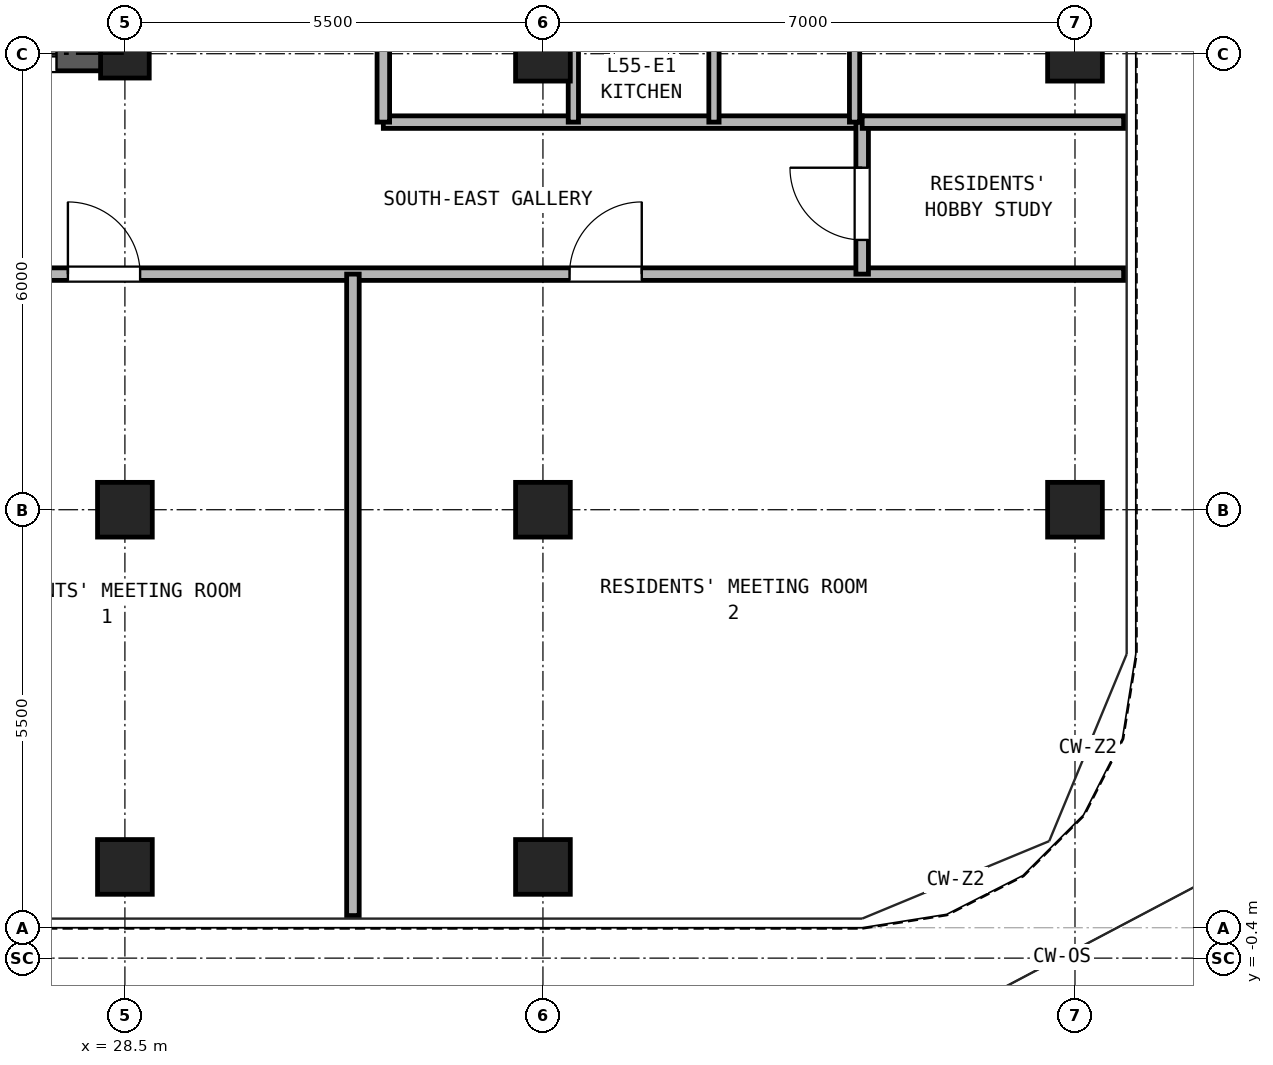
"""IFC4 building model, lengths in metres.
Left out: names, types, materials, properties, quantities, classifications, styles, units other than length and angle.
Written with IfcOpenShell. Run it as: python <this file> out.ifc"""

import sys

from ifc_helpers import new_model, si_unit, direction, frame, frame_2d, origin, origin_2d, place, context, subcontext, project, spatial, rectangle, hollow_rectangle, extrude, source, transform, mapped, element, fill, save


model = new_model("IFC4")
c1 = context("Model", 3, precision=1e-05, world=origin(), true_north=direction((0.0, 1.0)))
c2 = subcontext(c1, "Body", "Model", "MODEL_VIEW")
j1 = project(units=[si_unit("LENGTHUNIT", "METRE"), si_unit("PLANEANGLEUNIT", "RADIAN")], contexts=[c1])
p1 = place(None, origin())
s1 = spatial("IfcSite", under=j1, at=p1, CompositionType="ELEMENT")
p2 = place(p1, origin())
s2 = spatial("IfcBuilding", under=s1, at=p2, CompositionType="ELEMENT")
p3 = place(p2, frame((0.0, 0.0, 196.4)))
s3 = spatial("IfcBuildingStorey", under=s2, at=p3, CompositionType="ELEMENT", Elevation=196.4)
m1 = source(origin(), c2, "Body", "SweptSolid", [
    extrude(hollow_rectangle(XDim=0.72, YDim=0.72, WallThickness=0.04, at=origin_2d()), origin(), (0.0, 0.0, 1.0), 2.95),
])
for number, where, z_axis, x_axis in (
    (1, (28.5, 0.8, 0.0), (0.0, 0.0, 1.0), (1.0, 0.0, 0.0)),
    (2, (34.0, 0.8, 0.0), (0.0, 0.0, 1.0), (1.0, 0.0, 0.0)),
    (3, (41.0, 5.5, 0.0), (0.0, 0.0, 1.0), (1.0, 0.0, 0.0)),
    (4, (41.0, 11.5, 0.0), (0.0, 0.0, 1.0), (1.0, 0.0, 0.0)),
    (5, (28.5, 5.5, 0.0), (0.0, 0.0, 1.0), (1.0, 0.0, 0.0)),
):
    element("IfcColumn", number, at=place(p3, frame(where, z_axis=z_axis, x_axis=x_axis)), inside=s3, PredefinedType="COLUMN", context=c2, shape_type="MappedRepresentation", body=[
        mapped(m1, transform((0.0, 0.0, 0.0), x_axis=(1.0, 0.0, 0.0), y_axis=(0.0, 1.0, 0.0), z_axis=(0.0, 0.0, 1.0), scale=1.0)),
    ])
m2 = source(origin(), c2, "Body", "SweptSolid", [
    extrude(hollow_rectangle(XDim=0.64, YDim=0.64, WallThickness=0.035, at=origin_2d()), origin(), (0.0, 0.0, 1.0), 2.95),
])
p4 = place(p3, frame((28.5, 11.5, 0.0), z_axis=(0.0, 0.0, 1.0), x_axis=(1.0, 0.0, 0.0)))
e6 = element("IfcColumn", 6, at=p4, inside=s3, PredefinedType="COLUMN", context=c2, shape_type="MappedRepresentation", body=[
    mapped(m2, transform((0.0, 0.0, 0.0), x_axis=(1.0, 0.0, 0.0), y_axis=(0.0, 1.0, 0.0), z_axis=(0.0, 0.0, 1.0), scale=1.0)),
])
for number, where, z_axis, x_axis in (
    (7, (34.0, 5.5, 0.0), (0.0, 0.0, 1.0), (1.0, 0.0, 0.0)),
    (8, (34.0, 11.5, 0.0), (0.0, 0.0, 1.0), (1.0, 0.0, 0.0)),
):
    element("IfcColumn", number, at=place(p3, frame(where, z_axis=z_axis, x_axis=x_axis)), inside=s3, PredefinedType="COLUMN", context=c2, shape_type="MappedRepresentation", body=[
        mapped(m1, transform((0.0, 0.0, 0.0), x_axis=(1.0, 0.0, 0.0), y_axis=(0.0, 1.0, 0.0), z_axis=(0.0, 0.0, 1.0), scale=1.0)),
    ])
p5 = place(p3, frame((18.275, 11.5, 0.0), z_axis=(0.0, 0.0, 1.0), x_axis=(1.0, 0.0, 0.0)))
e9 = element("IfcWall", 9, at=p5, inside=s3, PredefinedType="SHEAR", context=c2, shape_type="SweptSolid", body=[
    extrude(rectangle(XDim=10.45, YDim=0.45, at=frame_2d((5.225, 0.0))), origin(), (0.0, 0.0, 1.0), 2.95),
])
p6 = place(p5, frame((1.825, 0.0, 0.0)))
e10 = element("IfcOpeningElement", 10, at=p6, cuts=e9, PredefinedType="OPENING", context=c2, shape_type="SweptSolid", body=[
    extrude(rectangle(XDim=0.95, YDim=2.15, at=frame_2d((0.475, 1.075))), frame((0.0, 0.235, 0.0), z_axis=(0.0, -1.0, 0.0), x_axis=(1.0, 0.0, 0.0)), (0.0, 0.0, 1.0), 0.47),
])
p7 = place(p5, frame((5.325, 0.0, 0.0)))
e11 = element("IfcOpeningElement", 11, at=p7, cuts=e9, PredefinedType="OPENING", context=c2, shape_type="SweptSolid", body=[
    extrude(rectangle(XDim=0.95, YDim=2.15, at=frame_2d((0.475, 1.075))), frame((0.0, 0.235, 0.0), z_axis=(0.0, -1.0, 0.0), x_axis=(1.0, 0.0, 0.0)), (0.0, 0.0, 1.0), 0.47),
])
p8 = place(p5, frame((8.225, 0.0, 0.0)))
e12 = element("IfcOpeningElement", 12, at=p8, cuts=e9, PredefinedType="OPENING", context=c2, shape_type="SweptSolid", body=[
    extrude(rectangle(XDim=1.1, YDim=2.25, at=frame_2d((0.55, 1.125))), frame((0.0, 0.235, 0.0), z_axis=(0.0, -1.0, 0.0), x_axis=(1.0, 0.0, 0.0)), (0.0, 0.0, 1.0), 0.47),
])
p9 = place(p3, frame((0.16, 8.6, 0.0), z_axis=(0.0, 0.0, 1.0), x_axis=(1.0, 0.0, 0.0)))
e13 = element("IfcWall", 13, at=p9, inside=s3, PredefinedType="PARTITIONING", context=c2, shape_type="SweptSolid", body=[
    extrude(rectangle(XDim=41.48, YDim=0.165, at=frame_2d((20.74, 0.0))), origin(), (0.0, 0.0, 1.0), 2.583),
])
p10 = place(p9, frame((11.89, 0.0, 0.0)))
e14 = element("IfcOpeningElement", 14, at=p10, cuts=e13, PredefinedType="OPENING", context=c2, shape_type="SweptSolid", body=[
    extrude(rectangle(XDim=0.95, YDim=2.15, at=frame_2d((0.475, 1.075))), frame((0.0, 0.093, 0.0), z_axis=(0.0, -1.0, 0.0), x_axis=(1.0, 0.0, 0.0)), (0.0, 0.0, 1.0), 0.185),
])
p11 = place(p9, frame((20.59, 0.0, 0.0)))
e15 = element("IfcOpeningElement", 15, at=p11, cuts=e13, PredefinedType="OPENING", context=c2, shape_type="SweptSolid", body=[
    extrude(rectangle(XDim=0.95, YDim=2.15, at=frame_2d((0.475, 1.075))), frame((0.0, 0.093, 0.0), z_axis=(0.0, -1.0, 0.0), x_axis=(1.0, 0.0, 0.0)), (0.0, 0.0, 1.0), 0.185),
])
p12 = place(p9, frame((27.59, 0.0, 0.0)))
e16 = element("IfcOpeningElement", 16, at=p12, cuts=e13, PredefinedType="OPENING", context=c2, shape_type="SweptSolid", body=[
    extrude(rectangle(XDim=0.95, YDim=2.15, at=frame_2d((0.475, 1.075))), frame((0.0, 0.093, 0.0), z_axis=(0.0, -1.0, 0.0), x_axis=(1.0, 0.0, 0.0)), (0.0, 0.0, 1.0), 0.185),
])
p13 = place(p9, frame((34.19, 0.0, 0.0)))
e17 = element("IfcOpeningElement", 17, at=p13, cuts=e13, PredefinedType="OPENING", context=c2, shape_type="SweptSolid", body=[
    extrude(rectangle(XDim=0.95, YDim=2.15, at=frame_2d((0.475, 1.075))), frame((0.0, 0.093, 0.0), z_axis=(0.0, -1.0, 0.0), x_axis=(1.0, 0.0, 0.0)), (0.0, 0.0, 1.0), 0.185),
])
p14 = place(p3, frame((31.9, 10.6, 0.0), z_axis=(0.0, 0.0, 1.0), x_axis=(1.0, 0.0, 0.0)))
e18 = element("IfcWall", 18, at=p14, inside=s3, PredefinedType="PARTITIONING", context=c2, shape_type="SweptSolid", body=[
    extrude(rectangle(XDim=6.3, YDim=0.165, at=frame_2d((3.15, 0.0))), origin(), (0.0, 0.0, 1.0), 2.95),
])
p15 = place(p3, frame((38.2, 8.6, 0.0), z_axis=(0.0, 0.0, 1.0), x_axis=(0.0, 1.0, 0.0)))
e19 = element("IfcWall", 19, at=p15, inside=s3, PredefinedType="PARTITIONING", context=c2, shape_type="SweptSolid", body=[
    extrude(rectangle(XDim=2.0, YDim=0.165, at=frame_2d((1.0, 0.0))), origin(), (0.0, 0.0, 1.0), 2.95),
])
p16 = place(p15, frame((0.45, 0.0, 0.0)))
e20 = element("IfcOpeningElement", 20, at=p16, cuts=e19, PredefinedType="OPENING", context=c2, shape_type="SweptSolid", body=[
    extrude(rectangle(XDim=0.95, YDim=2.15, at=frame_2d((0.475, 1.075))), frame((0.0, 0.093, 0.0), z_axis=(0.0, -1.0, 0.0), x_axis=(1.0, 0.0, 0.0)), (0.0, 0.0, 1.0), 0.185),
])
p17 = place(p3, frame((31.9, 10.6, 0.0), z_axis=(0.0, 0.0, 1.0), x_axis=(0.0, 1.0, 0.0)))
e21 = element("IfcWall", 21, at=p17, inside=s3, PredefinedType="PARTITIONING", context=c2, shape_type="SweptSolid", body=[
    extrude(rectangle(XDim=24.54, YDim=0.165, at=frame_2d((12.27, 0.0))), origin(), (0.0, 0.0, 1.0), 2.95),
])
p18 = place(p17, frame((5.95, 0.0, 0.0)))
e22 = element("IfcOpeningElement", 22, at=p18, cuts=e21, PredefinedType="OPENING", context=c2, shape_type="SweptSolid", body=[
    extrude(rectangle(XDim=1.0, YDim=2.15, at=frame_2d((0.5, 1.075))), frame((0.0, 0.093, 0.0), z_axis=(0.0, -1.0, 0.0), x_axis=(1.0, 0.0, 0.0)), (0.0, 0.0, 1.0), 0.185),
])
p19 = place(p17, frame((16.65, 0.0, 0.0)))
e23 = element("IfcOpeningElement", 23, at=p19, cuts=e21, PredefinedType="OPENING", context=c2, shape_type="SweptSolid", body=[
    extrude(rectangle(XDim=1.0, YDim=2.15, at=frame_2d((0.5, 1.075))), frame((0.0, 0.093, 0.0), z_axis=(0.0, -1.0, 0.0), x_axis=(1.0, 0.0, 0.0)), (0.0, 0.0, 1.0), 0.185),
])
p20 = place(p3, frame((31.5, 0.16, 0.0), z_axis=(0.0, 0.0, 1.0), x_axis=(0.0, 1.0, 0.0)))
e24 = element("IfcWall", 24, at=p20, inside=s3, PredefinedType="PARTITIONING", context=c2, shape_type="SweptSolid", body=[
    extrude(rectangle(XDim=8.44, YDim=0.165, at=frame_2d((4.22, 0.0))), origin(), (0.0, 0.0, 1.0), 2.95),
])
p21 = place(p3, frame((38.2, 10.6, 0.0), z_axis=(0.0, 0.0, 1.0), x_axis=(1.0, 0.0, 0.0)))
e25 = element("IfcWall", 25, at=p21, inside=s3, PredefinedType="PARTITIONING", context=c2, shape_type="SweptSolid", body=[
    extrude(rectangle(XDim=3.44, YDim=0.165, at=frame_2d((1.72, 0.0))), origin(), (0.0, 0.0, 1.0), 2.95),
])
for number, where, z_axis, x_axis in (
    (26, (34.4, 10.6, 0.0), (0.0, 0.0, 1.0), (0.0, 1.0, 0.0)),
    (27, (36.25, 10.6, 0.0), (0.0, 0.0, 1.0), (0.0, 1.0, 0.0)),
    (28, (38.1, 10.6, 0.0), (0.0, 0.0, 1.0), (0.0, 1.0, 0.0)),
):
    element("IfcWall", number, at=place(p3, frame(where, z_axis=z_axis, x_axis=x_axis)), inside=s3, PredefinedType="PARTITIONING", context=c2, shape_type="SweptSolid", body=[
        extrude(rectangle(XDim=2.15, YDim=0.135, at=frame_2d((1.075, 0.0))), origin(), (0.0, 0.0, 1.0), 2.95),
    ])
p22 = place(p8, frame((1.1, 0.0, 0.0), z_axis=(0.0, 0.0, 1.0), x_axis=(-1.0, 0.0, 0.0)))
e29 = element("IfcDoor", 29, at=p22, inside=s3, OperationType="DOUBLE_DOOR_SLIDING", PredefinedType="DOOR", context=c2, shape_type="SweptSolid", body=[
    extrude(rectangle(XDim=1.1, YDim=2.25, at=frame_2d((0.55, 1.125))), frame((0.0, 0.025, 0.0), z_axis=(0.0, -1.0, 0.0), x_axis=(1.0, 0.0, 0.0)), (0.0, 0.0, 1.0), 0.05),
])
fill(e12, e29)
p23 = place(p12, frame((0.95, 0.0, 0.0), z_axis=(0.0, 0.0, 1.0), x_axis=(-1.0, 0.0, 0.0)))
e30 = element("IfcDoor", 30, at=p23, inside=s3, OperationType="SINGLE_SWING_LEFT", PredefinedType="DOOR", context=c2, shape_type="SweptSolid", body=[
    extrude(rectangle(XDim=0.95, YDim=2.15, at=frame_2d((0.475, 1.075))), frame((0.0, 0.025, 0.0), z_axis=(0.0, -1.0, 0.0), x_axis=(1.0, 0.0, 0.0)), (0.0, 0.0, 1.0), 0.05),
])
fill(e16, e30)
p24 = place(p13, frame((0.95, 0.0, 0.0), z_axis=(0.0, 0.0, 1.0), x_axis=(-1.0, 0.0, 0.0)))
e31 = element("IfcDoor", 31, at=p24, inside=s3, OperationType="SINGLE_SWING_RIGHT", PredefinedType="DOOR", context=c2, shape_type="SweptSolid", body=[
    extrude(rectangle(XDim=0.95, YDim=2.15, at=frame_2d((0.475, 1.075))), frame((0.0, 0.025, 0.0), z_axis=(0.0, -1.0, 0.0), x_axis=(1.0, 0.0, 0.0)), (0.0, 0.0, 1.0), 0.05),
])
fill(e17, e31)
p25 = place(p16, origin())
e32 = element("IfcDoor", 32, at=p25, inside=s3, OperationType="SINGLE_SWING_RIGHT", PredefinedType="DOOR", context=c2, shape_type="SweptSolid", body=[
    extrude(rectangle(XDim=0.95, YDim=2.15, at=frame_2d((0.475, 1.075))), frame((0.0, 0.025, 0.0), z_axis=(0.0, -1.0, 0.0), x_axis=(1.0, 0.0, 0.0)), (0.0, 0.0, 1.0), 0.05),
])
fill(e20, e32)
save(model, sys.argv[1])
